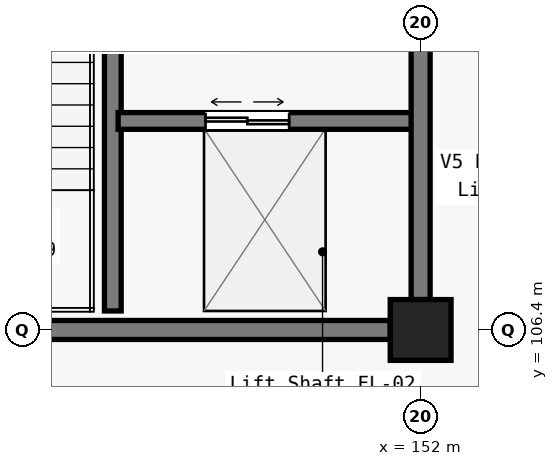
"""IFC4 building model, lengths in metres.
Left out: names, types, materials, properties, quantities, classifications, styles, units other than length and angle.
Written with IfcOpenShell. Run it as: python <this file> out.ifc"""

import sys

from ifc_helpers import new_model, si_unit, direction, frame, frame_2d, origin, origin_2d, place, context, subcontext, project, spatial, rectangle, circle, extrude, element, fill, save


model = new_model("IFC4")
c1 = context("Model", 3, precision=1e-05, world=origin(), true_north=direction((0.0, 1.0)))
c2 = subcontext(c1, "Body", "Model", "MODEL_VIEW")
j1 = project(units=[si_unit("LENGTHUNIT", "METRE"), si_unit("PLANEANGLEUNIT", "RADIAN")], contexts=[c1])
p1 = place(None, origin())
s1 = spatial("IfcSite", under=j1, at=p1, CompositionType="ELEMENT")
p2 = place(p1, origin())
s2 = spatial("IfcBuilding", under=s1, at=p2, CompositionType="ELEMENT")
p3 = place(p2, frame((0.0, 0.0, -5.4)))
s3 = spatial("IfcBuildingStorey", under=s2, at=p3, CompositionType="ELEMENT", Elevation=-5.4)
p4 = place(p3, frame((152.0, 106.4, 0.0), z_axis=(0.0, 0.0, 1.0), x_axis=(1.0, 0.0, 0.0)))
e1 = element("IfcColumn", 1, at=p4, inside=s3, PredefinedType="COLUMN", context=c2, shape_type="SweptSolid", body=[
    extrude(circle(Radius=0.4, at=origin_2d()), origin(), (0.0, 0.0, 1.0), 5.4),
])
p5 = place(p3, frame((144.25, 106.4, 0.0), z_axis=(0.0, 0.0, 1.0), x_axis=(1.0, 0.0, 0.0)))
e2 = element("IfcWall", 2, at=p5, inside=s3, PredefinedType="SOLIDWALL", context=c2, shape_type="SweptSolid", body=[
    extrude(rectangle(XDim=7.35, YDim=0.25, at=frame_2d((3.675, 0.0))), origin(), (0.0, 0.0, 1.0), 4.12),
])
p6 = place(p3, frame((147.95, 106.65, 0.0), z_axis=(0.0, 0.0, 1.0), x_axis=(0.0, 1.0, 0.0)))
e3 = element("IfcWall", 3, at=p6, inside=s3, PredefinedType="SOLIDWALL", context=c2, shape_type="SweptSolid", body=[
    extrude(rectangle(XDim=7.1, YDim=0.22, at=frame_2d((3.55, 0.0))), origin(), (0.0, 0.0, 1.0), 5.08),
])
p7 = place(p6, frame((5.55, 0.0, 0.0)))
e4 = element("IfcOpeningElement", 4, at=p7, cuts=e3, PredefinedType="OPENING", context=c2, shape_type="SweptSolid", body=[
    extrude(rectangle(XDim=1.2, YDim=2.15, at=frame_2d((0.6, 1.075))), frame((0.0, 0.12, 0.0), z_axis=(0.0, -1.0, 0.0), x_axis=(1.0, 0.0, 0.0)), (0.0, 0.0, 1.0), 0.24),
])
p8 = place(p3, frame((148.02, 109.15, 0.0), z_axis=(0.0, 0.0, 1.0), x_axis=(1.0, 0.0, 0.0)))
e5 = element("IfcWall", 5, at=p8, inside=s3, PredefinedType="SOLIDWALL", context=c2, shape_type="SweptSolid", body=[
    extrude(rectangle(XDim=3.93, YDim=0.22, at=frame_2d((1.965, 0.0))), origin(), (0.0, 0.0, 1.0), 4.43),
])
p9 = place(p8, frame((1.15, 0.0, 0.0)))
e6 = element("IfcOpeningElement", 6, at=p9, cuts=e5, PredefinedType="OPENING", context=c2, shape_type="SweptSolid", body=[
    extrude(rectangle(XDim=1.1, YDim=2.2, at=frame_2d((0.55, 1.1))), frame((0.0, 0.12, 0.0), z_axis=(0.0, -1.0, 0.0), x_axis=(1.0, 0.0, 0.0)), (0.0, 0.0, 1.0), 0.24),
])
p10 = place(p3, frame((152.0, 106.8, 0.0), z_axis=(0.0, 0.0, 1.0), x_axis=(0.0, 1.0, 0.0)))
e7 = element("IfcWall", 7, at=p10, inside=s3, PredefinedType="SOLIDWALL", context=c2, shape_type="SweptSolid", body=[
    extrude(rectangle(XDim=6.875, YDim=0.25, at=frame_2d((3.438, 0.0))), origin(), (0.0, 0.0, 1.0), 4.255),
])
p11 = place(p10, frame((3.45, 0.0, 0.0)))
e8 = element("IfcOpeningElement", 8, at=p11, cuts=e7, PredefinedType="OPENING", context=c2, shape_type="SweptSolid", body=[
    extrude(rectangle(XDim=1.35, YDim=2.2, at=frame_2d((0.675, 1.1))), frame((0.0, 0.135, 0.0), z_axis=(0.0, -1.0, 0.0), x_axis=(1.0, 0.0, 0.0)), (0.0, 0.0, 1.0), 0.27),
])
p12 = place(p9, origin())
e9 = element("IfcDoor", 9, at=p12, inside=s3, OperationType="DOUBLE_DOOR_SLIDING", PredefinedType="DOOR", context=c2, shape_type="SweptSolid", body=[
    extrude(rectangle(XDim=1.1, YDim=2.2, at=frame_2d((0.55, 1.1))), frame((0.0, 0.025, 0.0), z_axis=(0.0, -1.0, 0.0), x_axis=(1.0, 0.0, 0.0)), (0.0, 0.0, 1.0), 0.05),
])
fill(e6, e9)
save(model, sys.argv[1])
